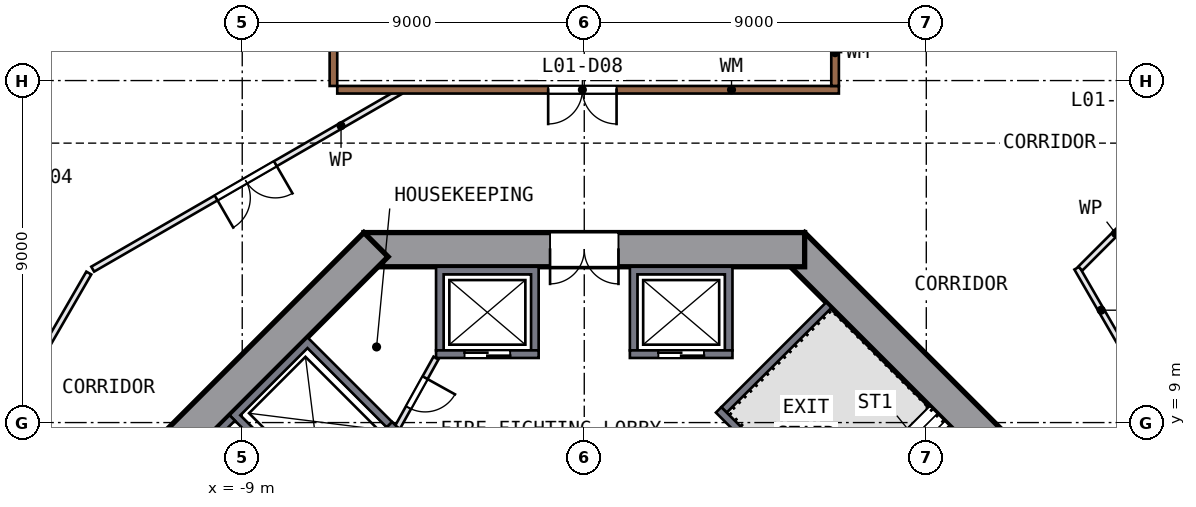
"""IFC4 building model, lengths in metres.
Left out: names, types, materials, properties, quantities, classifications, styles, units other than length and angle.
Written with IfcOpenShell. Run it as: python <this file> out.ifc"""

import sys

from ifc_helpers import new_model, si_unit, direction, frame, frame_2d, origin, place, context, subcontext, project, spatial, polyline, rectangle, outline, extrude, element, fill, save


model = new_model("IFC4")
c1 = context("Model", 3, precision=1e-05, world=origin(), true_north=direction((0.0, 1.0)))
c2 = subcontext(c1, "Body", "Model", "MODEL_VIEW")
j1 = project(units=[si_unit("LENGTHUNIT", "METRE"), si_unit("PLANEANGLEUNIT", "RADIAN")], contexts=[c1])
p1 = place(None, origin())
s1 = spatial("IfcSite", under=j1, at=p1, CompositionType="ELEMENT")
p2 = place(p1, origin())
s2 = spatial("IfcBuilding", under=s1, at=p2, CompositionType="ELEMENT")
p3 = place(p2, frame((0.0, 0.0, 8.0)))
s3 = spatial("IfcBuildingStorey", under=s2, at=p3, CompositionType="ELEMENT", Elevation=8.0)
p4 = place(p3, frame((13.682, 5.481, 0.0), z_axis=(0.0, 0.0, 1.0), x_axis=(-0.707106781, 0.707106781, 0.0)))
e1 = element("IfcWall", 1, at=p4, inside=s3, PredefinedType="SHEAR", context=c2, shape_type="SweptSolid", body=[
    extrude(rectangle(XDim=11.598, YDim=0.9, at=frame_2d((5.799, 0.0))), origin(), (0.0, 0.0, 1.0), 6.0),
])
p5 = place(p4, frame((2.099, 0.0, 0.0)))
e2 = element("IfcOpeningElement", 2, at=p5, cuts=e1, PredefinedType="OPENING", context=c2, shape_type="SweptSolid", body=[
    extrude(rectangle(XDim=1.2, YDim=2.1, at=frame_2d((0.6, 1.05))), frame((0.0, 0.46, 0.0), z_axis=(0.0, -1.0, 0.0), x_axis=(1.0, 0.0, 0.0)), (0.0, 0.0, 1.0), 0.92),
])
p6 = place(p3, frame((5.799, 13.55, 0.0), z_axis=(0.0, 0.0, 1.0), x_axis=(-1.0, 0.0, 0.0)))
e3 = element("IfcWall", 3, at=p6, inside=s3, PredefinedType="SHEAR", context=c2, shape_type="SweptSolid", body=[
    extrude(rectangle(XDim=11.598, YDim=0.9, at=frame_2d((5.799, 0.0))), origin(), (0.0, 0.0, 1.0), 6.0),
])
p7 = place(p6, frame((4.899, 0.0, 0.0)))
e4 = element("IfcOpeningElement", 4, at=p7, cuts=e3, PredefinedType="OPENING", context=c2, shape_type="SweptSolid", body=[
    extrude(rectangle(XDim=1.8, YDim=2.1, at=frame_2d((0.9, 1.05))), frame((0.0, 0.46, 0.0), z_axis=(0.0, -1.0, 0.0), x_axis=(1.0, 0.0, 0.0)), (0.0, 0.0, 1.0), 0.92),
])
p8 = place(p3, frame((-5.481, 13.682, 0.0), z_axis=(0.0, 0.0, 1.0), x_axis=(-0.707106781, -0.707106781, 0.0)))
e5 = element("IfcWall", 5, at=p8, inside=s3, PredefinedType="SHEAR", context=c2, shape_type="SweptSolid", body=[
    extrude(rectangle(XDim=11.598, YDim=0.9, at=frame_2d((5.799, 0.0))), origin(), (0.0, 0.0, 1.0), 6.0),
])
p9 = place(p3, frame((17.586, 17.777, 0.0), z_axis=(0.0, 0.0, 1.0), x_axis=(-0.866020975, 0.500007671, 0.0)))
e6 = element("IfcWall", 6, at=p9, inside=s3, PredefinedType="SOLIDWALL", context=c2, shape_type="SweptSolid", body=[
    extrude(rectangle(XDim=4.446, YDim=0.14, at=frame_2d((2.223, 0.0))), origin(), (0.0, 0.0, 1.0), 5.55),
])
p10 = place(p9, frame((1.593, 0.0, 0.0)))
e7 = element("IfcOpeningElement", 7, at=p10, cuts=e6, PredefinedType="OPENING", context=c2, shape_type="SweptSolid", body=[
    extrude(rectangle(XDim=1.8, YDim=2.4, at=frame_2d((0.9, 1.2))), frame((0.0, 0.08, 0.0), z_axis=(0.0, -1.0, 0.0), x_axis=(1.0, 0.0, 0.0)), (0.0, 0.0, 1.0), 0.16),
])
p11 = place(p3, frame((-6.36, 24.258, 0.0), z_axis=(0.0, 0.0, 1.0), x_axis=(-0.866029009, -0.499993756, 0.0)))
e8 = element("IfcWall", 8, at=p11, inside=s3, PredefinedType="SOLIDWALL", context=c2, shape_type="SweptSolid", body=[
    extrude(rectangle(XDim=13.242, YDim=0.14, at=frame_2d((6.621, 0.0))), origin(), (0.0, 0.0, 1.0), 5.55),
])
p12 = place(p11, frame((1.46, 0.0, 0.9)))
e9 = element("IfcOpeningElement", 9, at=p12, cuts=e8, PredefinedType="OPENING", context=c2, shape_type="SweptSolid", body=[
    extrude(rectangle(XDim=3.6, YDim=3.6, at=frame_2d((1.8, 1.8))), frame((0.0, 0.08, 0.0), z_axis=(0.0, -1.0, 0.0), x_axis=(1.0, 0.0, 0.0)), (0.0, 0.0, 1.0), 0.16),
])
p13 = place(p11, frame((8.215, 0.0, 0.9)))
e10 = element("IfcOpeningElement", 10, at=p13, cuts=e8, PredefinedType="OPENING", context=c2, shape_type="SweptSolid", body=[
    extrude(rectangle(XDim=3.0, YDim=3.6, at=frame_2d((1.5, 1.8))), frame((0.0, 0.08, 0.0), z_axis=(0.0, -1.0, 0.0), x_axis=(1.0, 0.0, 0.0)), (0.0, 0.0, 1.0), 0.16),
])
p14 = place(p3, origin())
e11 = element("IfcWall", 11, at=p14, inside=s3, PredefinedType="SOLIDWALL", context=c2, shape_type="SweptSolid", body=[
    extrude(outline(polyline([(3.9, 13.1), (3.9, 10.9), (3.7, 10.9), (3.7, 12.9), (1.4, 12.9), (1.4, 10.9), (1.2, 10.9), (1.2, 13.1), (3.9, 13.1)])), origin(), (0.0, 0.0, 1.0), 5.55),
])
p15 = place(p3, frame((1.2, 10.8, 0.0), z_axis=(0.0, 0.0, 1.0), x_axis=(1.0, 0.0, 0.0)))
e12 = element("IfcWall", 12, at=p15, inside=s3, PredefinedType="SOLIDWALL", context=c2, shape_type="SweptSolid", body=[
    extrude(rectangle(XDim=2.7, YDim=0.2, at=frame_2d((1.35, 0.0))), origin(), (0.0, 0.0, 1.0), 5.55),
])
p16 = place(p15, frame((0.75, 0.0, 0.0)))
e13 = element("IfcOpeningElement", 13, at=p16, cuts=e12, PredefinedType="OPENING", context=c2, shape_type="SweptSolid", body=[
    extrude(rectangle(XDim=1.2, YDim=2.1, at=frame_2d((0.6, 1.05))), frame((0.0, 0.11, 0.0), z_axis=(0.0, -1.0, 0.0), x_axis=(1.0, 0.0, 0.0)), (0.0, 0.0, 1.0), 0.22),
])
p17 = place(p3, origin())
e14 = element("IfcWall", 14, at=p17, inside=s3, PredefinedType="SOLIDWALL", context=c2, shape_type="SweptSolid", body=[
    extrude(outline(polyline([(-3.9, 10.9), (-3.9, 13.1), (-1.2, 13.1), (-1.2, 10.9), (-1.4, 10.9), (-1.4, 12.9), (-3.7, 12.9), (-3.7, 10.9), (-3.9, 10.9)])), origin(), (0.0, 0.0, 1.0), 5.55),
])
p18 = place(p3, frame((-1.2, 10.8, 0.0), z_axis=(0.0, 0.0, 1.0), x_axis=(-1.0, 0.0, 0.0)))
e15 = element("IfcWall", 15, at=p18, inside=s3, PredefinedType="SOLIDWALL", context=c2, shape_type="SweptSolid", body=[
    extrude(rectangle(XDim=2.7, YDim=0.2, at=frame_2d((1.35, 0.0))), origin(), (0.0, 0.0, 1.0), 5.55),
])
p19 = place(p18, frame((0.75, 0.0, 0.0)))
e16 = element("IfcOpeningElement", 16, at=p19, cuts=e15, PredefinedType="OPENING", context=c2, shape_type="SweptSolid", body=[
    extrude(rectangle(XDim=1.2, YDim=2.1, at=frame_2d((0.6, 1.05))), frame((0.0, 0.11, 0.0), z_axis=(0.0, -1.0, 0.0), x_axis=(1.0, 0.0, 0.0)), (0.0, 0.0, 1.0), 0.22),
])
p20 = place(p3, origin())
e17 = element("IfcWall", 17, at=p20, inside=s3, PredefinedType="SOLIDWALL", context=c2, shape_type="SweptSolid", body=[
    extrude(outline(polyline([(-9.334, 9.192), (-7.283, 11.243), (-5.056, 9.016), (-5.197, 8.874), (-7.283, 10.96), (-9.051, 9.192), (-6.965, 7.106), (-7.106, 6.965), (-9.334, 9.192)])), origin(), (0.0, 0.0, 1.0), 5.55),
])
p21 = place(p3, frame((-4.985, 8.945, 0.0), z_axis=(0.0, 0.0, 1.0), x_axis=(-0.707106781, -0.707106781, 0.0)))
e18 = element("IfcWall", 18, at=p21, inside=s3, PredefinedType="SOLIDWALL", context=c2, shape_type="SweptSolid", body=[
    extrude(rectangle(XDim=2.9, YDim=0.2, at=frame_2d((1.45, 0.0))), origin(), (0.0, 0.0, 1.0), 5.55),
])
p22 = place(p21, frame((0.85, 0.0, 0.0)))
e19 = element("IfcOpeningElement", 19, at=p22, cuts=e18, PredefinedType="OPENING", context=c2, shape_type="SweptSolid", body=[
    extrude(rectangle(XDim=1.2, YDim=2.1, at=frame_2d((0.6, 1.05))), frame((0.0, 0.11, 0.0), z_axis=(0.0, -1.0, 0.0), x_axis=(1.0, 0.0, 0.0)), (0.0, 0.0, 1.0), 0.22),
])
p23 = place(p3, origin())
e20 = element("IfcWall", 20, at=p23, inside=s3, PredefinedType="SOLIDWALL", context=c2, shape_type="SweptSolid", body=[
    extrude(outline(polyline([(-11.243, 7.283), (-9.334, 9.192), (-9.192, 9.051), (-10.96, 7.283), (-8.874, 5.197), (-9.016, 5.056), (-11.243, 7.283)])), origin(), (0.0, 0.0, 1.0), 5.55),
])
p24 = place(p3, frame((3.535, 9.334, 0.0), z_axis=(0.0, 0.0, 1.0), x_axis=(0.707106781, -0.707106781, 0.0)))
e21 = element("IfcWall", 21, at=p24, inside=s3, PredefinedType="SOLIDWALL", context=c2, shape_type="SweptSolid", body=[
    extrude(rectangle(XDim=8.2, YDim=0.2, at=frame_2d((4.1, 0.0))), origin(), (0.0, 0.0, 1.0), 5.55),
])
p25 = place(p24, frame((6.6, 0.0, 0.0)))
e22 = element("IfcOpeningElement", 22, at=p25, cuts=e21, PredefinedType="OPENING", context=c2, shape_type="SweptSolid", body=[
    extrude(rectangle(XDim=1.2, YDim=2.1, at=frame_2d((0.6, 1.05))), frame((0.0, 0.11, 0.0), z_axis=(0.0, -1.0, 0.0), x_axis=(1.0, 0.0, 0.0)), (0.0, 0.0, 1.0), 0.22),
])
p26 = place(p3, frame((3.677, 9.334, 0.0), z_axis=(0.0, 0.0, 1.0), x_axis=(0.707106781, 0.707106781, 0.0)))
e23 = element("IfcWall", 23, at=p26, inside=s3, PredefinedType="SOLIDWALL", context=c2, shape_type="SweptSolid", body=[
    extrude(rectangle(XDim=3.9, YDim=0.2, at=frame_2d((1.95, 0.0))), origin(), (0.0, 0.0, 1.0), 5.55),
])
p27 = place(p3, frame((-3.9, 10.7, 0.0), z_axis=(0.0, 0.0, 1.0), x_axis=(-0.485692555, -0.874129705, 0.0)))
e24 = element("IfcWall", 24, at=p27, inside=s3, PredefinedType="PARTITIONING", context=c2, shape_type="SweptSolid", body=[
    extrude(rectangle(XDim=2.089, YDim=0.15, at=frame_2d((1.044, 0.0))), origin(), (0.0, 0.0, 1.0), 5.55),
])
p28 = place(p27, frame((0.594, 0.0, 0.0)))
e25 = element("IfcOpeningElement", 25, at=p28, cuts=e24, PredefinedType="OPENING", context=c2, shape_type="SweptSolid", body=[
    extrude(rectangle(XDim=0.9, YDim=2.1, at=frame_2d((0.45, 1.05))), frame((0.0, 0.085, 0.0), z_axis=(0.0, -1.0, 0.0), x_axis=(1.0, 0.0, 0.0)), (0.0, 0.0, 1.0), 0.17),
])
p29 = place(p3, frame((-17.721, 4.823, 0.0), z_axis=(0.0, 0.0, 1.0), x_axis=(0.499979668, 0.866037142, 0.0)))
e26 = element("IfcWall", 26, at=p29, inside=s3, PredefinedType="PARTITIONING", context=c2, shape_type="SweptSolid", body=[
    extrude(rectangle(XDim=9.367, YDim=0.15, at=frame_2d((4.683, 0.0))), origin(), (0.0, 0.0, 1.0), 5.55),
])
p30 = place(p3, frame((-4.845, 17.708, 0.0), z_axis=(0.0, 0.0, 1.0), x_axis=(-0.866032826, -0.499987144, 0.0)))
e27 = element("IfcWall", 27, at=p30, inside=s3, PredefinedType="PARTITIONING", context=c2, shape_type="SweptSolid", body=[
    extrude(rectangle(XDim=9.342, YDim=0.15, at=frame_2d((4.671, 0.0))), origin(), (0.0, 0.0, 1.0), 5.55),
])
p31 = place(p30, frame((3.792, 0.0, 0.0)))
e28 = element("IfcOpeningElement", 28, at=p31, cuts=e27, PredefinedType="OPENING", context=c2, shape_type="SweptSolid", body=[
    extrude(rectangle(XDim=1.8, YDim=2.1, at=frame_2d((0.9, 1.05))), frame((0.0, 0.085, 0.0), z_axis=(0.0, -1.0, 0.0), x_axis=(1.0, 0.0, 0.0)), (0.0, 0.0, 1.0), 0.17),
])
p32 = place(p3, frame((6.7, 17.758, 0.0), z_axis=(0.0, 0.0, 1.0), x_axis=(-1.0, 0.0, 0.0)))
e29 = element("IfcWall", 29, at=p32, inside=s3, PredefinedType="SOLIDWALL", context=c2, shape_type="SweptSolid", body=[
    extrude(rectangle(XDim=13.2, YDim=0.2, at=frame_2d((6.6, 0.0))), origin(), (0.0, 0.0, 1.0), 5.55),
])
p33 = place(p32, frame((5.85, 0.0, 0.0)))
e30 = element("IfcOpeningElement", 30, at=p33, cuts=e29, PredefinedType="OPENING", context=c2, shape_type="SweptSolid", body=[
    extrude(rectangle(XDim=1.8, YDim=2.1, at=frame_2d((0.9, 1.05))), frame((0.0, 0.11, 0.0), z_axis=(0.0, -1.0, 0.0), x_axis=(1.0, 0.0, 0.0)), (0.0, 0.0, 1.0), 0.22),
])
p34 = place(p3, frame((-6.6, 23.415, 0.0), z_axis=(0.0, 0.0, 1.0), x_axis=(0.0, -1.0, 0.0)))
e31 = element("IfcWall", 31, at=p34, inside=s3, PredefinedType="SOLIDWALL", context=c2, shape_type="SweptSolid", body=[
    extrude(rectangle(XDim=5.557, YDim=0.2, at=frame_2d((2.778, 0.0))), origin(), (0.0, 0.0, 1.0), 5.55),
])
p35 = place(p3, frame((6.6, 23.415, 0.0), z_axis=(0.0, 0.0, 1.0), x_axis=(0.0, -1.0, 0.0)))
e32 = element("IfcWall", 32, at=p35, inside=s3, PredefinedType="SOLIDWALL", context=c2, shape_type="SweptSolid", body=[
    extrude(rectangle(XDim=5.557, YDim=0.2, at=frame_2d((2.778, 0.0))), origin(), (0.0, 0.0, 1.0), 5.55),
])
p36 = place(p35, frame((1.807, 0.0, 0.0)))
e33 = element("IfcOpeningElement", 33, at=p36, cuts=e32, PredefinedType="OPENING", context=c2, shape_type="SweptSolid", body=[
    extrude(rectangle(XDim=1.8, YDim=2.1, at=frame_2d((0.9, 1.05))), frame((0.0, 0.11, 0.0), z_axis=(0.0, -1.0, 0.0), x_axis=(1.0, 0.0, 0.0)), (0.0, 0.0, 1.0), 0.22),
])
p37 = place(p3, frame((12.962, 13.065, 0.0), z_axis=(0.0, 0.0, 1.0), x_axis=(0.499997778, -0.866026686, 0.0)))
e34 = element("IfcWall", 34, at=p37, inside=s3, PredefinedType="PARTITIONING", context=c2, shape_type="SweptSolid", body=[
    extrude(rectangle(XDim=2.559, YDim=0.15, at=frame_2d((1.279, 0.0))), origin(), (0.0, 0.0, 1.0), 5.55),
])
p38 = place(p3, frame((17.7, 17.7, 0.0), z_axis=(0.0, 0.0, 1.0), x_axis=(-0.707106781, -0.707106781, 0.0)))
e35 = element("IfcWall", 35, at=p38, inside=s3, PredefinedType="PARTITIONING", context=c2, shape_type="SweptSolid", body=[
    extrude(rectangle(XDim=6.572, YDim=0.15, at=frame_2d((3.286, 0.0))), origin(), (0.0, 0.0, 1.0), 5.55),
])
p39 = place(p38, frame((2.75, 0.0, 0.0)))
e36 = element("IfcOpeningElement", 36, at=p39, cuts=e35, PredefinedType="OPENING", context=c2, shape_type="SweptSolid", body=[
    extrude(rectangle(XDim=1.0, YDim=2.1, at=frame_2d((0.5, 1.05))), frame((0.0, 0.085, 0.0), z_axis=(0.0, -1.0, 0.0), x_axis=(1.0, 0.0, 0.0)), (0.0, 0.0, 1.0), 0.17),
])
p40 = place(p13, origin())
e37 = element("IfcWindow", 37, at=p40, inside=s3, PartitioningType="SINGLE_PANEL", PredefinedType="WINDOW", context=c2, shape_type="SweptSolid", body=[
    extrude(rectangle(XDim=3.0, YDim=3.6, at=frame_2d((1.5, 1.8))), frame((0.0, 0.03, 0.0), z_axis=(0.0, -1.0, 0.0), x_axis=(1.0, 0.0, 0.0)), (0.0, 0.0, 1.0), 0.06),
])
fill(e10, e37)
p41 = place(p16, origin())
e38 = element("IfcDoor", 38, at=p41, inside=s3, OperationType="DOUBLE_DOOR_SLIDING", PredefinedType="DOOR", context=c2, shape_type="SweptSolid", body=[
    extrude(rectangle(XDim=1.2, YDim=2.1, at=frame_2d((0.6, 1.05))), frame((0.0, 0.025, 0.0), z_axis=(0.0, -1.0, 0.0), x_axis=(1.0, 0.0, 0.0)), (0.0, 0.0, 1.0), 0.05),
])
fill(e13, e38)
p42 = place(p19, origin())
e39 = element("IfcDoor", 39, at=p42, inside=s3, OperationType="DOUBLE_DOOR_SLIDING", PredefinedType="DOOR", context=c2, shape_type="SweptSolid", body=[
    extrude(rectangle(XDim=1.2, YDim=2.1, at=frame_2d((0.6, 1.05))), frame((0.0, 0.025, 0.0), z_axis=(0.0, -1.0, 0.0), x_axis=(1.0, 0.0, 0.0)), (0.0, 0.0, 1.0), 0.05),
])
fill(e16, e39)
p43 = place(p7, origin())
e40 = element("IfcDoor", 40, at=p43, inside=s3, OperationType="DOUBLE_DOOR_SINGLE_SWING", PredefinedType="DOOR", context=c2, shape_type="SweptSolid", body=[
    extrude(rectangle(XDim=1.8, YDim=2.1, at=frame_2d((0.9, 1.05))), frame((0.0, 0.025, 0.0), z_axis=(0.0, -1.0, 0.0), x_axis=(1.0, 0.0, 0.0)), (0.0, 0.0, 1.0), 0.05),
])
fill(e4, e40)
p44 = place(p28, origin())
e41 = element("IfcDoor", 41, at=p44, inside=s3, OperationType="SINGLE_SWING_LEFT", PredefinedType="DOOR", context=c2, shape_type="SweptSolid", body=[
    extrude(rectangle(XDim=0.9, YDim=2.1, at=frame_2d((0.45, 1.05))), frame((0.0, 0.025, 0.0), z_axis=(0.0, -1.0, 0.0), x_axis=(1.0, 0.0, 0.0)), (0.0, 0.0, 1.0), 0.05),
])
fill(e25, e41)
p45 = place(p31, origin())
e42 = element("IfcDoor", 42, at=p45, inside=s3, OperationType="DOUBLE_DOOR_SINGLE_SWING", PredefinedType="DOOR", context=c2, shape_type="SweptSolid", body=[
    extrude(rectangle(XDim=1.8, YDim=2.1, at=frame_2d((0.9, 1.05))), frame((0.0, 0.025, 0.0), z_axis=(0.0, -1.0, 0.0), x_axis=(1.0, 0.0, 0.0)), (0.0, 0.0, 1.0), 0.05),
])
fill(e28, e42)
p46 = place(p33, origin())
e43 = element("IfcDoor", 43, at=p46, inside=s3, OperationType="DOUBLE_DOOR_SINGLE_SWING", PredefinedType="DOOR", context=c2, shape_type="SweptSolid", body=[
    extrude(rectangle(XDim=1.8, YDim=2.1, at=frame_2d((0.9, 1.05))), frame((0.0, 0.025, 0.0), z_axis=(0.0, -1.0, 0.0), x_axis=(1.0, 0.0, 0.0)), (0.0, 0.0, 1.0), 0.05),
])
fill(e30, e43)
save(model, sys.argv[1])
